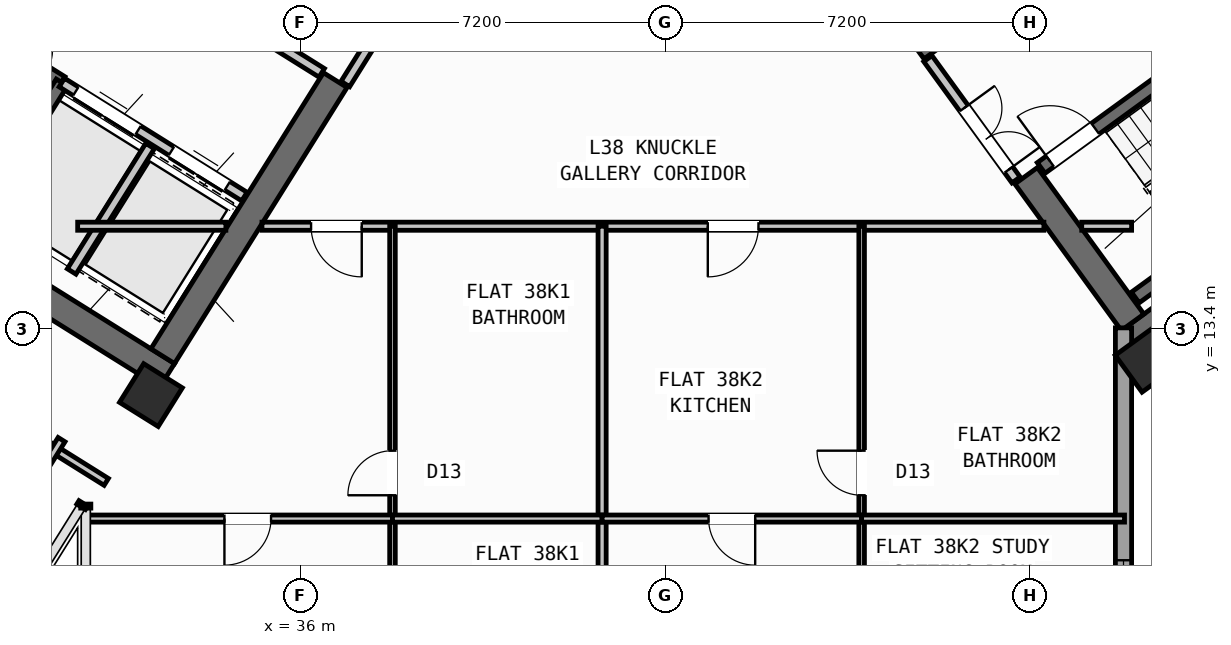
"""IFC4 building model, lengths in metres.
Left out: names, types, materials, properties, quantities, classifications, styles, units other than length and angle.
Written with IfcOpenShell. Run it as: python <this file> out.ifc"""

import sys

from ifc_helpers import new_model, si_unit, direction, frame, frame_2d, origin, origin_2d, place, context, subcontext, project, spatial, rectangle, hollow_rectangle, extrude, source, transform, mapped, element, fill, save


model = new_model("IFC4")
c1 = context("Model", 3, precision=1e-05, world=origin(), true_north=direction((0.0, 1.0)))
c2 = subcontext(c1, "Body", "Model", "MODEL_VIEW")
j1 = project(units=[si_unit("LENGTHUNIT", "METRE"), si_unit("PLANEANGLEUNIT", "RADIAN")], contexts=[c1])
p1 = place(None, origin())
s1 = spatial("IfcSite", under=j1, at=p1, CompositionType="ELEMENT")
p2 = place(p1, origin())
s2 = spatial("IfcBuilding", under=s1, at=p2, CompositionType="ELEMENT")
p3 = place(p2, frame((0.0, 0.0, 151.5)))
s3 = spatial("IfcBuildingStorey", under=s2, at=p3, CompositionType="ELEMENT", Elevation=151.5)
p4 = place(p3, frame((33.366, 12.477, 0.0), z_axis=(0.0, 0.0, 1.0), x_axis=(-0.848047359947, 0.529920442413, 0.0)))
e1 = element("IfcWall", 1, at=p4, inside=s3, PredefinedType="SHEAR", context=c2, shape_type="SweptSolid", body=[
    extrude(rectangle(XDim=13.14, YDim=0.55, at=frame_2d((6.57, 0.0))), origin(), (0.0, 0.0, 1.0), 3.35),
])
p5 = place(p3, frame((36.683, 18.304, 0.0), z_axis=(0.0, 0.0, 1.0), x_axis=(-0.529896466841, -0.848062341122, 0.0)))
e2 = element("IfcWall", 2, at=p5, inside=s3, PredefinedType="SHEAR", context=c2, shape_type="SweptSolid", body=[
    extrude(rectangle(XDim=6.425, YDim=0.55, at=frame_2d((3.212, 0.0))), origin(), (0.0, 0.0, 1.0), 3.35),
])
p6 = place(p3, frame((52.359, 13.14, 0.0), z_axis=(0.0, 0.0, 1.0), x_axis=(0.809014896919, 0.587788139183, 0.0)))
e3 = element("IfcWall", 3, at=p6, inside=s3, PredefinedType="SHEAR", context=c2, shape_type="SweptSolid", body=[
    extrude(rectangle(XDim=12.34, YDim=0.55, at=frame_2d((6.17, 0.0))), origin(), (0.0, 0.0, 1.0), 3.35),
])
p7 = place(p3, frame((52.42, 13.524, 0.0), z_axis=(0.0, 0.0, 1.0), x_axis=(-0.587802113096, 0.809004744015, 0.0)))
e4 = element("IfcWall", 4, at=p7, inside=s3, PredefinedType="SHEAR", context=c2, shape_type="SweptSolid", body=[
    extrude(rectangle(XDim=3.575, YDim=0.55, at=frame_2d((1.788, 0.0))), origin(), (0.0, 0.0, 1.0), 3.35),
])
p8 = place(p3, frame((48.526, 18.884, 0.0), z_axis=(0.0, 0.0, 1.0), x_axis=(-0.587764933797, 0.809031756236, 0.0)))
e5 = element("IfcWall", 5, at=p8, inside=s3, PredefinedType="SHEAR", context=c2, shape_type="SweptSolid", body=[
    extrude(rectangle(XDim=6.425, YDim=0.55, at=frame_2d((3.212, 0.0))), origin(), (0.0, 0.0, 1.0), 3.35),
])
m1 = source(origin(), c2, "Body", "SweptSolid", [
    extrude(hollow_rectangle(XDim=0.9, YDim=0.9, WallThickness=0.036, at=origin_2d()), origin(), (0.0, 0.0, 1.0), 3.6),
])
for number, where, z_axis, x_axis in (
    (6, (33.046, 12.087, 0.0), (0.0, 0.0, 1.0), (-0.848, 0.53, 0.0)),
    (7, (52.705, 12.773, 0.0), (0.0, 0.0, 1.0), (0.809, 0.588, 0.0)),
):
    element("IfcColumn", number, at=place(p3, frame(where, z_axis=z_axis, x_axis=x_axis)), inside=s3, PredefinedType="COLUMN", context=c2, shape_type="MappedRepresentation", body=[
        mapped(m1, transform((0.0, 0.0, 0.0), scale=1.0)),
    ])
p9 = place(p3, frame((56.581, 7.439, 0.0), z_axis=(0.0, 0.0, 1.0), x_axis=(-0.587771678454, 0.809026856172, 0.0)))
e8 = element("IfcWall", 8, at=p9, inside=s3, PredefinedType="STANDARD", context=c2, shape_type="SweptSolid", body=[
    extrude(rectangle(XDim=6.824, YDim=0.32, at=frame_2d((3.412, 0.0))), origin(), (0.0, 0.0, 1.0), 2.775),
])
p10 = place(p9, frame((1.531, 0.0, 0.8)))
e9 = element("IfcOpeningElement", 9, at=p10, cuts=e8, PredefinedType="OPENING", context=c2, shape_type="SweptSolid", body=[
    extrude(rectangle(XDim=2.1, YDim=1.55, at=frame_2d((1.05, 0.775))), frame((0.0, 0.17, 0.0), z_axis=(0.0, -1.0, 0.0), x_axis=(1.0, 0.0, 0.0)), (0.0, 0.0, 1.0), 0.34),
])
p11 = place(p3, frame((52.24, 13.414, 0.0), z_axis=(0.0, 0.0, 1.0), x_axis=(0.0, -1.0, 0.0)))
e10 = element("IfcWall", 10, at=p11, inside=s3, PredefinedType="STANDARD", context=c2, shape_type="SweptSolid", body=[
    extrude(rectangle(XDim=9.948, YDim=0.32, at=frame_2d((4.974, 0.0))), origin(), (0.0, 0.0, 1.0), 3.35),
])
p12 = place(p11, frame((4.586, 0.0, 0.8)))
e11 = element("IfcOpeningElement", 11, at=p12, cuts=e10, PredefinedType="OPENING", context=c2, shape_type="SweptSolid", body=[
    extrude(rectangle(XDim=2.1, YDim=1.55, at=frame_2d((1.05, 0.775))), frame((0.0, 0.17, 0.0), z_axis=(0.0, -1.0, 0.0), x_axis=(1.0, 0.0, 0.0)), (0.0, 0.0, 1.0), 0.34),
])
p13 = place(p11, frame((8.298, 0.0, 1.0)))
e12 = element("IfcOpeningElement", 12, at=p13, cuts=e10, PredefinedType="OPENING", context=c2, shape_type="SweptSolid", body=[
    extrude(rectangle(XDim=0.9, YDim=1.25, at=frame_2d((0.45, 0.625))), frame((0.0, 0.17, 0.0), z_axis=(0.0, -1.0, 0.0), x_axis=(1.0, 0.0, 0.0)), (0.0, 0.0, 1.0), 0.34),
])
p14 = place(p3, frame((31.28, 18.261, 0.0), z_axis=(0.0, 0.0, 1.0), x_axis=(-0.848051618787, 0.529913626805, 0.0)))
e13 = element("IfcWall", 13, at=p14, inside=s3, PredefinedType="SHEAR", context=c2, shape_type="SweptSolid", body=[
    extrude(rectangle(XDim=7.46, YDim=0.26, at=frame_2d((3.73, 0.0))), origin(), (0.0, 0.0, 1.0), 3.35),
])
p15 = place(p14, frame((0.36, 0.0, 0.0)))
e14 = element("IfcOpeningElement", 14, at=p15, cuts=e13, PredefinedType="OPENING", context=c2, shape_type="SweptSolid", body=[
    extrude(rectangle(XDim=0.86, YDim=2.05, at=frame_2d((0.43, 1.025))), frame((0.0, 0.14, 0.0), z_axis=(0.0, -1.0, 0.0), x_axis=(1.0, 0.0, 0.0)), (0.0, 0.0, 1.0), 0.28),
])
p16 = place(p3, frame((31.288, 18.256, 0.0), z_axis=(0.0, 0.0, 1.0), x_axis=(-0.529943379326, -0.848033026897, 0.0)))
e15 = element("IfcWall", 15, at=p16, inside=s3, PredefinedType="SHEAR", context=c2, shape_type="SweptSolid", body=[
    extrude(rectangle(XDim=3.16, YDim=0.26, at=frame_2d((1.58, 0.0))), origin(), (0.0, 0.0, 1.0), 3.35),
])
p17 = place(p3, frame((34.891, 16.005, 0.0), z_axis=(0.0, 0.0, 1.0), x_axis=(-0.848062873452, 0.529895614884, 0.0)))
e16 = element("IfcWall", 16, at=p17, inside=s3, PredefinedType="STANDARD", context=c2, shape_type="SweptSolid", body=[
    extrude(rectangle(XDim=4.248, YDim=0.2, at=frame_2d((2.124, 0.0))), origin(), (0.0, 0.0, 1.0), 3.34),
])
p18 = place(p17, frame((0.398, 0.0, 0.0)))
e17 = element("IfcOpeningElement", 17, at=p18, cuts=e16, PredefinedType="OPENING", context=c2, shape_type="SweptSolid", body=[
    extrude(rectangle(XDim=1.3, YDim=2.2, at=frame_2d((0.65, 1.1))), frame((0.0, 0.11, 0.0), z_axis=(0.0, -1.0, 0.0), x_axis=(1.0, 0.0, 0.0)), (0.0, 0.0, 1.0), 0.22),
])
p19 = place(p17, frame((2.473, 0.0, 0.0)))
e18 = element("IfcOpeningElement", 18, at=p19, cuts=e16, PredefinedType="OPENING", context=c2, shape_type="SweptSolid", body=[
    extrude(rectangle(XDim=1.45, YDim=2.25, at=frame_2d((0.725, 1.125))), frame((0.0, 0.11, 0.0), z_axis=(0.0, -1.0, 0.0), x_axis=(1.0, 0.0, 0.0)), (0.0, 0.0, 1.0), 0.22),
])
p20 = place(p3, frame((36.417, 18.447, 0.0), z_axis=(0.0, 0.0, 1.0), x_axis=(-0.848064879198, 0.529892404805, 0.0)))
e19 = element("IfcWall", 19, at=p20, inside=s3, PredefinedType="STANDARD", context=c2, shape_type="SweptSolid", body=[
    extrude(rectangle(XDim=5.768, YDim=0.2, at=frame_2d((2.884, 0.0))), origin(), (0.0, 0.0, 1.0), 3.34),
])
p21 = place(p20, frame((2.548, 0.0, 0.0)))
e20 = element("IfcOpeningElement", 20, at=p21, cuts=e19, PredefinedType="OPENING", context=c2, shape_type="SweptSolid", body=[
    extrude(rectangle(XDim=1.15, YDim=2.1, at=frame_2d((0.575, 1.05))), frame((0.0, 0.11, 0.0), z_axis=(0.0, -1.0, 0.0), x_axis=(1.0, 0.0, 0.0)), (0.0, 0.0, 1.0), 0.22),
])
p22 = place(p3, frame((33.029, 17.003, 0.0), z_axis=(0.0, 0.0, 1.0), x_axis=(-0.529916267533, -0.848049968695, 0.0)))
e21 = element("IfcWall", 21, at=p22, inside=s3, PredefinedType="STANDARD", context=c2, shape_type="SweptSolid", body=[
    extrude(rectangle(XDim=2.92, YDim=0.2, at=frame_2d((1.46, 0.0))), origin(), (0.0, 0.0, 1.0), 3.34),
])
p23 = place(p3, frame((52.472, 14.013, 0.0), z_axis=(0.0, 0.0, 1.0), x_axis=(0.809028366311, 0.587769599847, 0.0)))
e22 = element("IfcWall", 22, at=p23, inside=s3, PredefinedType="SHEAR", context=c2, shape_type="SweptSolid", body=[
    extrude(rectangle(XDim=7.33, YDim=0.26, at=frame_2d((3.665, 0.0))), origin(), (0.0, 0.0, 1.0), 3.35),
])
p24 = place(p3, frame((50.615, 16.57, 0.0), z_axis=(0.0, 0.0, 1.0), x_axis=(0.809028366311, 0.587769599847, 0.0)))
e23 = element("IfcWall", 23, at=p24, inside=s3, PredefinedType="SHEAR", context=c2, shape_type="SweptSolid", body=[
    extrude(rectangle(XDim=7.33, YDim=0.26, at=frame_2d((3.665, 0.0))), origin(), (0.0, 0.0, 1.0), 3.35),
])
p25 = place(p24, frame((0.22, 0.0, 0.0)))
e24 = element("IfcOpeningElement", 24, at=p25, cuts=e23, PredefinedType="OPENING", context=c2, shape_type="SweptSolid", body=[
    extrude(rectangle(XDim=1.1, YDim=2.1, at=frame_2d((0.55, 1.05))), frame((0.0, 0.14, 0.0), z_axis=(0.0, -1.0, 0.0), x_axis=(1.0, 0.0, 0.0)), (0.0, 0.0, 1.0), 0.28),
])
p26 = place(p3, frame((32.164, 10.374, 0.0), z_axis=(0.0, 0.0, 1.0), x_axis=(-0.848044107957, 0.529925646633, 0.0)))
e25 = element("IfcWall", 25, at=p26, inside=s3, PredefinedType="PARTITIONING", context=c2, shape_type="SweptSolid", body=[
    extrude(rectangle(XDim=15.57, YDim=0.16, at=frame_2d((7.785, 0.0))), origin(), (0.0, 0.0, 1.0), 3.34),
])
p27 = place(p26, frame((10.83, 0.0, 0.0)))
e26 = element("IfcOpeningElement", 26, at=p27, cuts=e25, PredefinedType="OPENING", context=c2, shape_type="SweptSolid", body=[
    extrude(rectangle(XDim=1.0, YDim=2.1, at=frame_2d((0.5, 1.05))), frame((0.0, 0.09, 0.0), z_axis=(0.0, -1.0, 0.0), x_axis=(1.0, 0.0, 0.0)), (0.0, 0.0, 1.0), 0.18),
])
p28 = place(p3, frame((31.282, 11.208, 0.0), z_axis=(0.0, 0.0, 1.0), x_axis=(-0.529938869374, -0.84803584519, 0.0)))
e27 = element("IfcWall", 27, at=p28, inside=s3, PredefinedType="PARTITIONING", context=c2, shape_type="SweptSolid", body=[
    extrude(rectangle(XDim=5.48, YDim=0.16, at=frame_2d((2.74, 0.0))), origin(), (0.0, 0.0, 1.0), 3.34),
])
p29 = place(p3, frame((38.451, 20.737, 0.0), z_axis=(0.0, 0.0, 1.0), x_axis=(-0.529924799939, -0.848044637038, 0.0)))
e28 = element("IfcWall", 28, at=p29, inside=s3, PredefinedType="STANDARD", context=c2, shape_type="SweptSolid", body=[
    extrude(rectangle(XDim=2.96, YDim=0.2, at=frame_2d((1.48, 0.0))), origin(), (0.0, 0.0, 1.0), 3.34),
])
p30 = place(p29, frame((0.25, 0.0, 0.0)))
e29 = element("IfcOpeningElement", 29, at=p30, cuts=e28, PredefinedType="OPENING", context=c2, shape_type="SweptSolid", body=[
    extrude(rectangle(XDim=1.5, YDim=2.15, at=frame_2d((0.75, 1.075))), frame((0.0, 0.11, 0.0), z_axis=(0.0, -1.0, 0.0), x_axis=(1.0, 0.0, 0.0)), (0.0, 0.0, 1.0), 0.22),
])
p31 = place(p3, frame((31.6, 15.42, 0.0), z_axis=(0.0, 0.0, 1.0), x_axis=(1.0, 0.0, 0.0)))
e30 = element("IfcWall", 30, at=p31, inside=s3, PredefinedType="PARTITIONING", context=c2, shape_type="SweptSolid", body=[
    extrude(rectangle(XDim=2.925, YDim=0.16, at=frame_2d((1.462, 0.0))), origin(), (0.0, 0.0, 1.0), 3.34),
])
p32 = place(p3, frame((35.237, 15.42, 0.0), z_axis=(0.0, 0.0, 1.0), x_axis=(1.0, 0.0, 0.0)))
e31 = element("IfcWall", 31, at=p32, inside=s3, PredefinedType="PARTITIONING", context=c2, shape_type="SweptSolid", body=[
    extrude(rectangle(XDim=15.432, YDim=0.16, at=frame_2d((7.716, 0.0))), origin(), (0.0, 0.0, 1.0), 3.34),
])
p33 = place(p32, frame((0.969, 0.0, 0.0)))
e32 = element("IfcOpeningElement", 32, at=p33, cuts=e31, PredefinedType="OPENING", context=c2, shape_type="SweptSolid", body=[
    extrude(rectangle(XDim=1.0, YDim=2.1, at=frame_2d((0.5, 1.05))), frame((0.0, 0.09, 0.0), z_axis=(0.0, -1.0, 0.0), x_axis=(1.0, 0.0, 0.0)), (0.0, 0.0, 1.0), 0.18),
])
p34 = place(p32, frame((8.799, 0.0, 0.0)))
e33 = element("IfcOpeningElement", 33, at=p34, cuts=e31, PredefinedType="OPENING", context=c2, shape_type="SweptSolid", body=[
    extrude(rectangle(XDim=1.0, YDim=2.1, at=frame_2d((0.5, 1.05))), frame((0.0, 0.09, 0.0), z_axis=(0.0, -1.0, 0.0), x_axis=(1.0, 0.0, 0.0)), (0.0, 0.0, 1.0), 0.18),
])
p35 = place(p3, frame((51.416, 15.42, 0.0), z_axis=(0.0, 0.0, 1.0), x_axis=(1.0, 0.0, 0.0)))
e34 = element("IfcWall", 34, at=p35, inside=s3, PredefinedType="PARTITIONING", context=c2, shape_type="SweptSolid", body=[
    extrude(rectangle(XDim=0.984, YDim=0.16, at=frame_2d((0.492, 0.0))), origin(), (0.0, 0.0, 1.0), 3.34),
])
p36 = place(p3, frame((50.119, 16.333, 0.0), z_axis=(0.0, 0.0, 1.0), x_axis=(-0.587749856981, 0.809042709391, 0.0)))
e35 = element("IfcWall", 35, at=p36, inside=s3, PredefinedType="STANDARD", context=c2, shape_type="SweptSolid", body=[
    extrude(rectangle(XDim=2.96, YDim=0.2, at=frame_2d((1.48, 0.0))), origin(), (0.0, 0.0, 1.0), 3.34),
])
p37 = place(p36, frame((0.25, 0.0, 0.0)))
e36 = element("IfcOpeningElement", 36, at=p37, cuts=e35, PredefinedType="OPENING", context=c2, shape_type="SweptSolid", body=[
    extrude(rectangle(XDim=1.5, YDim=2.15, at=frame_2d((0.75, 1.075))), frame((0.0, 0.11, 0.0), z_axis=(0.0, -1.0, 0.0), x_axis=(1.0, 0.0, 0.0)), (0.0, 0.0, 1.0), 0.22),
])
p38 = place(p3, frame((41.95, 1.96, 0.0), z_axis=(0.0, 0.0, 1.0), x_axis=(0.0, 1.0, 0.0)))
e37 = element("IfcWall", 37, at=p38, inside=s3, PredefinedType="PARTITIONING", context=c2, shape_type="SweptSolid", body=[
    extrude(rectangle(XDim=13.46, YDim=0.16, at=frame_2d((6.73, 0.0))), origin(), (0.0, 0.0, 1.0), 3.34),
])
p39 = place(p3, frame((37.813, 1.96, 0.0), z_axis=(0.0, 0.0, 1.0), x_axis=(0.0, 1.0, 0.0)))
e38 = element("IfcWall", 38, at=p39, inside=s3, PredefinedType="PARTITIONING", context=c2, shape_type="SweptSolid", body=[
    extrude(rectangle(XDim=13.46, YDim=0.11, at=frame_2d((6.73, 0.0))), origin(), (0.0, 0.0, 1.0), 3.34),
])
p40 = place(p39, frame((4.97, 0.0, 0.0)))
e39 = element("IfcOpeningElement", 39, at=p40, cuts=e38, PredefinedType="OPENING", context=c2, shape_type="SweptSolid", body=[
    extrude(rectangle(XDim=0.92, YDim=2.08, at=frame_2d((0.46, 1.04))), frame((0.0, 0.065, 0.0), z_axis=(0.0, -1.0, 0.0), x_axis=(1.0, 0.0, 0.0)), (0.0, 0.0, 1.0), 0.13),
])
p41 = place(p39, frame((8.15, 0.0, 0.0)))
e40 = element("IfcOpeningElement", 40, at=p41, cuts=e38, PredefinedType="OPENING", context=c2, shape_type="SweptSolid", body=[
    extrude(rectangle(XDim=0.88, YDim=2.08, at=frame_2d((0.44, 1.04))), frame((0.0, 0.065, 0.0), z_axis=(0.0, -1.0, 0.0), x_axis=(1.0, 0.0, 0.0)), (0.0, 0.0, 1.0), 0.13),
])
p42 = place(p3, frame((31.74, 9.65, 0.0), z_axis=(0.0, 0.0, 1.0), x_axis=(1.0, 0.0, 0.0)))
e41 = element("IfcWall", 41, at=p42, inside=s3, PredefinedType="PLUMBINGWALL", context=c2, shape_type="SweptSolid", body=[
    extrude(rectangle(XDim=6.073, YDim=0.14, at=frame_2d((3.037, 0.0))), origin(), (0.0, 0.0, 1.0), 3.34),
])
p43 = place(p42, frame((2.757, 0.0, 0.0)))
e42 = element("IfcOpeningElement", 42, at=p43, cuts=e41, PredefinedType="OPENING", context=c2, shape_type="SweptSolid", body=[
    extrude(rectangle(XDim=0.92, YDim=2.08, at=frame_2d((0.46, 1.04))), frame((0.0, 0.08, 0.0), z_axis=(0.0, -1.0, 0.0), x_axis=(1.0, 0.0, 0.0)), (0.0, 0.0, 1.0), 0.16),
])
p44 = place(p3, frame((37.813, 9.65, 0.0), z_axis=(0.0, 0.0, 1.0), x_axis=(1.0, 0.0, 0.0)))
e43 = element("IfcWall", 43, at=p44, inside=s3, PredefinedType="PLUMBINGWALL", context=c2, shape_type="SweptSolid", body=[
    extrude(rectangle(XDim=4.137, YDim=0.14, at=frame_2d((2.068, 0.0))), origin(), (0.0, 0.0, 1.0), 3.34),
])
p45 = place(p3, frame((47.072, 1.96, 0.0), z_axis=(0.0, 0.0, 1.0), x_axis=(0.0, 1.0, 0.0)))
e44 = element("IfcWall", 44, at=p45, inside=s3, PredefinedType="PARTITIONING", context=c2, shape_type="SweptSolid", body=[
    extrude(rectangle(XDim=13.46, YDim=0.11, at=frame_2d((6.73, 0.0))), origin(), (0.0, 0.0, 1.0), 3.34),
])
p46 = place(p45, frame((4.97, 0.0, 0.0)))
e45 = element("IfcOpeningElement", 45, at=p46, cuts=e44, PredefinedType="OPENING", context=c2, shape_type="SweptSolid", body=[
    extrude(rectangle(XDim=0.92, YDim=2.08, at=frame_2d((0.46, 1.04))), frame((0.0, 0.065, 0.0), z_axis=(0.0, -1.0, 0.0), x_axis=(1.0, 0.0, 0.0)), (0.0, 0.0, 1.0), 0.13),
])
p47 = place(p45, frame((8.15, 0.0, 0.0)))
e46 = element("IfcOpeningElement", 46, at=p47, cuts=e44, PredefinedType="OPENING", context=c2, shape_type="SweptSolid", body=[
    extrude(rectangle(XDim=0.88, YDim=2.08, at=frame_2d((0.44, 1.04))), frame((0.0, 0.065, 0.0), z_axis=(0.0, -1.0, 0.0), x_axis=(1.0, 0.0, 0.0)), (0.0, 0.0, 1.0), 0.13),
])
p48 = place(p3, frame((41.95, 9.65, 0.0), z_axis=(0.0, 0.0, 1.0), x_axis=(1.0, 0.0, 0.0)))
e47 = element("IfcWall", 47, at=p48, inside=s3, PredefinedType="PLUMBINGWALL", context=c2, shape_type="SweptSolid", body=[
    extrude(rectangle(XDim=5.122, YDim=0.14, at=frame_2d((2.561, 0.0))), origin(), (0.0, 0.0, 1.0), 3.34),
])
p49 = place(p48, frame((2.101, 0.0, 0.0)))
e48 = element("IfcOpeningElement", 48, at=p49, cuts=e47, PredefinedType="OPENING", context=c2, shape_type="SweptSolid", body=[
    extrude(rectangle(XDim=0.92, YDim=2.08, at=frame_2d((0.46, 1.04))), frame((0.0, 0.08, 0.0), z_axis=(0.0, -1.0, 0.0), x_axis=(1.0, 0.0, 0.0)), (0.0, 0.0, 1.0), 0.16),
])
p50 = place(p3, frame((47.072, 9.65, 0.0), z_axis=(0.0, 0.0, 1.0), x_axis=(1.0, 0.0, 0.0)))
e49 = element("IfcWall", 49, at=p50, inside=s3, PredefinedType="PLUMBINGWALL", context=c2, shape_type="SweptSolid", body=[
    extrude(rectangle(XDim=5.188, YDim=0.14, at=frame_2d((2.594, 0.0))), origin(), (0.0, 0.0, 1.0), 3.34),
])
m2 = source(origin(), c2, "Body", "SweptSolid", [
    extrude(rectangle(XDim=2.1, YDim=1.55, at=frame_2d((1.05, 0.775))), frame((0.0, 0.03, 0.0), z_axis=(0.0, -1.0, 0.0), x_axis=(1.0, 0.0, 0.0)), (0.0, 0.0, 1.0), 0.06),
])
p51 = place(p12, origin())
e50 = element("IfcWindow", 50, at=p51, inside=s3, PartitioningType="SINGLE_PANEL", PredefinedType="WINDOW", context=c2, shape_type="MappedRepresentation", body=[
    mapped(m2, transform((0.0, 0.0, 0.0), scale=1.0)),
])
fill(e11, e50)
m3 = source(origin(), c2, "Body", "SweptSolid", [
    extrude(rectangle(XDim=1.3, YDim=2.2, at=frame_2d((0.65, 1.1))), frame((0.0, 0.025, 0.0), z_axis=(0.0, -1.0, 0.0), x_axis=(1.0, 0.0, 0.0)), (0.0, 0.0, 1.0), 0.05),
])
p52 = place(p18, origin())
e51 = element("IfcDoor", 51, at=p52, inside=s3, OperationType="DOUBLE_DOOR_SLIDING", PredefinedType="DOOR", context=c2, shape_type="MappedRepresentation", body=[
    mapped(m3, transform((0.0, 0.0, 0.0), scale=1.0)),
])
fill(e17, e51)
m4 = source(origin(), c2, "Body", "SweptSolid", [
    extrude(rectangle(XDim=1.45, YDim=2.25, at=frame_2d((0.725, 1.125))), frame((0.0, 0.025, 0.0), z_axis=(0.0, -1.0, 0.0), x_axis=(1.0, 0.0, 0.0)), (0.0, 0.0, 1.0), 0.05),
])
p53 = place(p19, origin())
e52 = element("IfcDoor", 52, at=p53, inside=s3, OperationType="DOUBLE_DOOR_SLIDING", PredefinedType="DOOR", context=c2, shape_type="MappedRepresentation", body=[
    mapped(m4, transform((0.0, 0.0, 0.0), scale=1.0)),
])
fill(e18, e52)
m5 = source(origin(), c2, "Body", "SweptSolid", [
    extrude(rectangle(XDim=1.1, YDim=2.1, at=frame_2d((0.55, 1.05))), frame((0.0, 0.025, 0.0), z_axis=(0.0, -1.0, 0.0), x_axis=(1.0, 0.0, 0.0)), (0.0, 0.0, 1.0), 0.05),
])
p54 = place(p25, origin())
e53 = element("IfcDoor", 53, at=p54, inside=s3, OperationType="SINGLE_SWING_LEFT", PredefinedType="DOOR", context=c2, shape_type="MappedRepresentation", body=[
    mapped(m5, transform((0.0, 0.0, 0.0), scale=1.0)),
])
fill(e24, e53)
m6 = source(origin(), c2, "Body", "SweptSolid", [
    extrude(rectangle(XDim=1.5, YDim=2.15, at=frame_2d((0.75, 1.075))), frame((0.0, 0.025, 0.0), z_axis=(0.0, -1.0, 0.0), x_axis=(1.0, 0.0, 0.0)), (0.0, 0.0, 1.0), 0.05),
])
p55 = place(p37, frame((1.5, 0.0, 0.0), z_axis=(0.0, 0.0, 1.0), x_axis=(-1.0, 0.0, 0.0)))
e54 = element("IfcDoor", 54, at=p55, inside=s3, OperationType="DOUBLE_DOOR_SINGLE_SWING", PredefinedType="DOOR", context=c2, shape_type="MappedRepresentation", body=[
    mapped(m6, transform((0.0, 0.0, 0.0), scale=1.0)),
])
fill(e36, e54)
m7 = source(origin(), c2, "Body", "SweptSolid", [
    extrude(rectangle(XDim=1.0, YDim=2.1, at=frame_2d((0.5, 1.05))), frame((0.0, 0.025, 0.0), z_axis=(0.0, -1.0, 0.0), x_axis=(1.0, 0.0, 0.0)), (0.0, 0.0, 1.0), 0.05),
])
p56 = place(p33, frame((1.0, 0.0, 0.0), z_axis=(0.0, 0.0, 1.0), x_axis=(-1.0, 0.0, 0.0)))
e55 = element("IfcDoor", 55, at=p56, inside=s3, OperationType="SINGLE_SWING_LEFT", PredefinedType="DOOR", context=c2, shape_type="MappedRepresentation", body=[
    mapped(m7, transform((0.0, 0.0, 0.0), scale=1.0)),
])
fill(e32, e55)
m8 = source(origin(), c2, "Body", "SweptSolid", [
    extrude(rectangle(XDim=0.92, YDim=2.08, at=frame_2d((0.46, 1.04))), frame((0.0, 0.025, 0.0), z_axis=(0.0, -1.0, 0.0), x_axis=(1.0, 0.0, 0.0)), (0.0, 0.0, 1.0), 0.05),
])
p57 = place(p43, frame((0.92, 0.0, 0.0), z_axis=(0.0, 0.0, 1.0), x_axis=(-1.0, 0.0, 0.0)))
e56 = element("IfcDoor", 56, at=p57, inside=s3, OperationType="SINGLE_SWING_RIGHT", PredefinedType="DOOR", context=c2, shape_type="MappedRepresentation", body=[
    mapped(m8, transform((0.0, 0.0, 0.0), scale=1.0)),
])
fill(e42, e56)
m9 = source(origin(), c2, "Body", "SweptSolid", [
    extrude(rectangle(XDim=0.88, YDim=2.08, at=frame_2d((0.44, 1.04))), frame((0.0, 0.025, 0.0), z_axis=(0.0, -1.0, 0.0), x_axis=(1.0, 0.0, 0.0)), (0.0, 0.0, 1.0), 0.05),
])
p58 = place(p41, origin())
e57 = element("IfcDoor", 57, at=p58, inside=s3, OperationType="SINGLE_SWING_LEFT", PredefinedType="DOOR", context=c2, shape_type="MappedRepresentation", body=[
    mapped(m9, transform((0.0, 0.0, 0.0), scale=1.0)),
])
fill(e40, e57)
p59 = place(p34, frame((1.0, 0.0, 0.0), z_axis=(0.0, 0.0, 1.0), x_axis=(-1.0, 0.0, 0.0)))
e58 = element("IfcDoor", 58, at=p59, inside=s3, OperationType="SINGLE_SWING_RIGHT", PredefinedType="DOOR", context=c2, shape_type="MappedRepresentation", body=[
    mapped(m7, transform((0.0, 0.0, 0.0), scale=1.0)),
])
fill(e33, e58)
p60 = place(p49, frame((0.92, 0.0, 0.0), z_axis=(0.0, 0.0, 1.0), x_axis=(-1.0, 0.0, 0.0)))
e59 = element("IfcDoor", 59, at=p60, inside=s3, OperationType="SINGLE_SWING_LEFT", PredefinedType="DOOR", context=c2, shape_type="MappedRepresentation", body=[
    mapped(m8, transform((0.0, 0.0, 0.0), scale=1.0)),
])
fill(e48, e59)
p61 = place(p47, origin())
e60 = element("IfcDoor", 60, at=p61, inside=s3, OperationType="SINGLE_SWING_RIGHT", PredefinedType="DOOR", context=c2, shape_type="MappedRepresentation", body=[
    mapped(m9, transform((0.0, 0.0, 0.0), scale=1.0)),
])
fill(e46, e60)
save(model, sys.argv[1])
